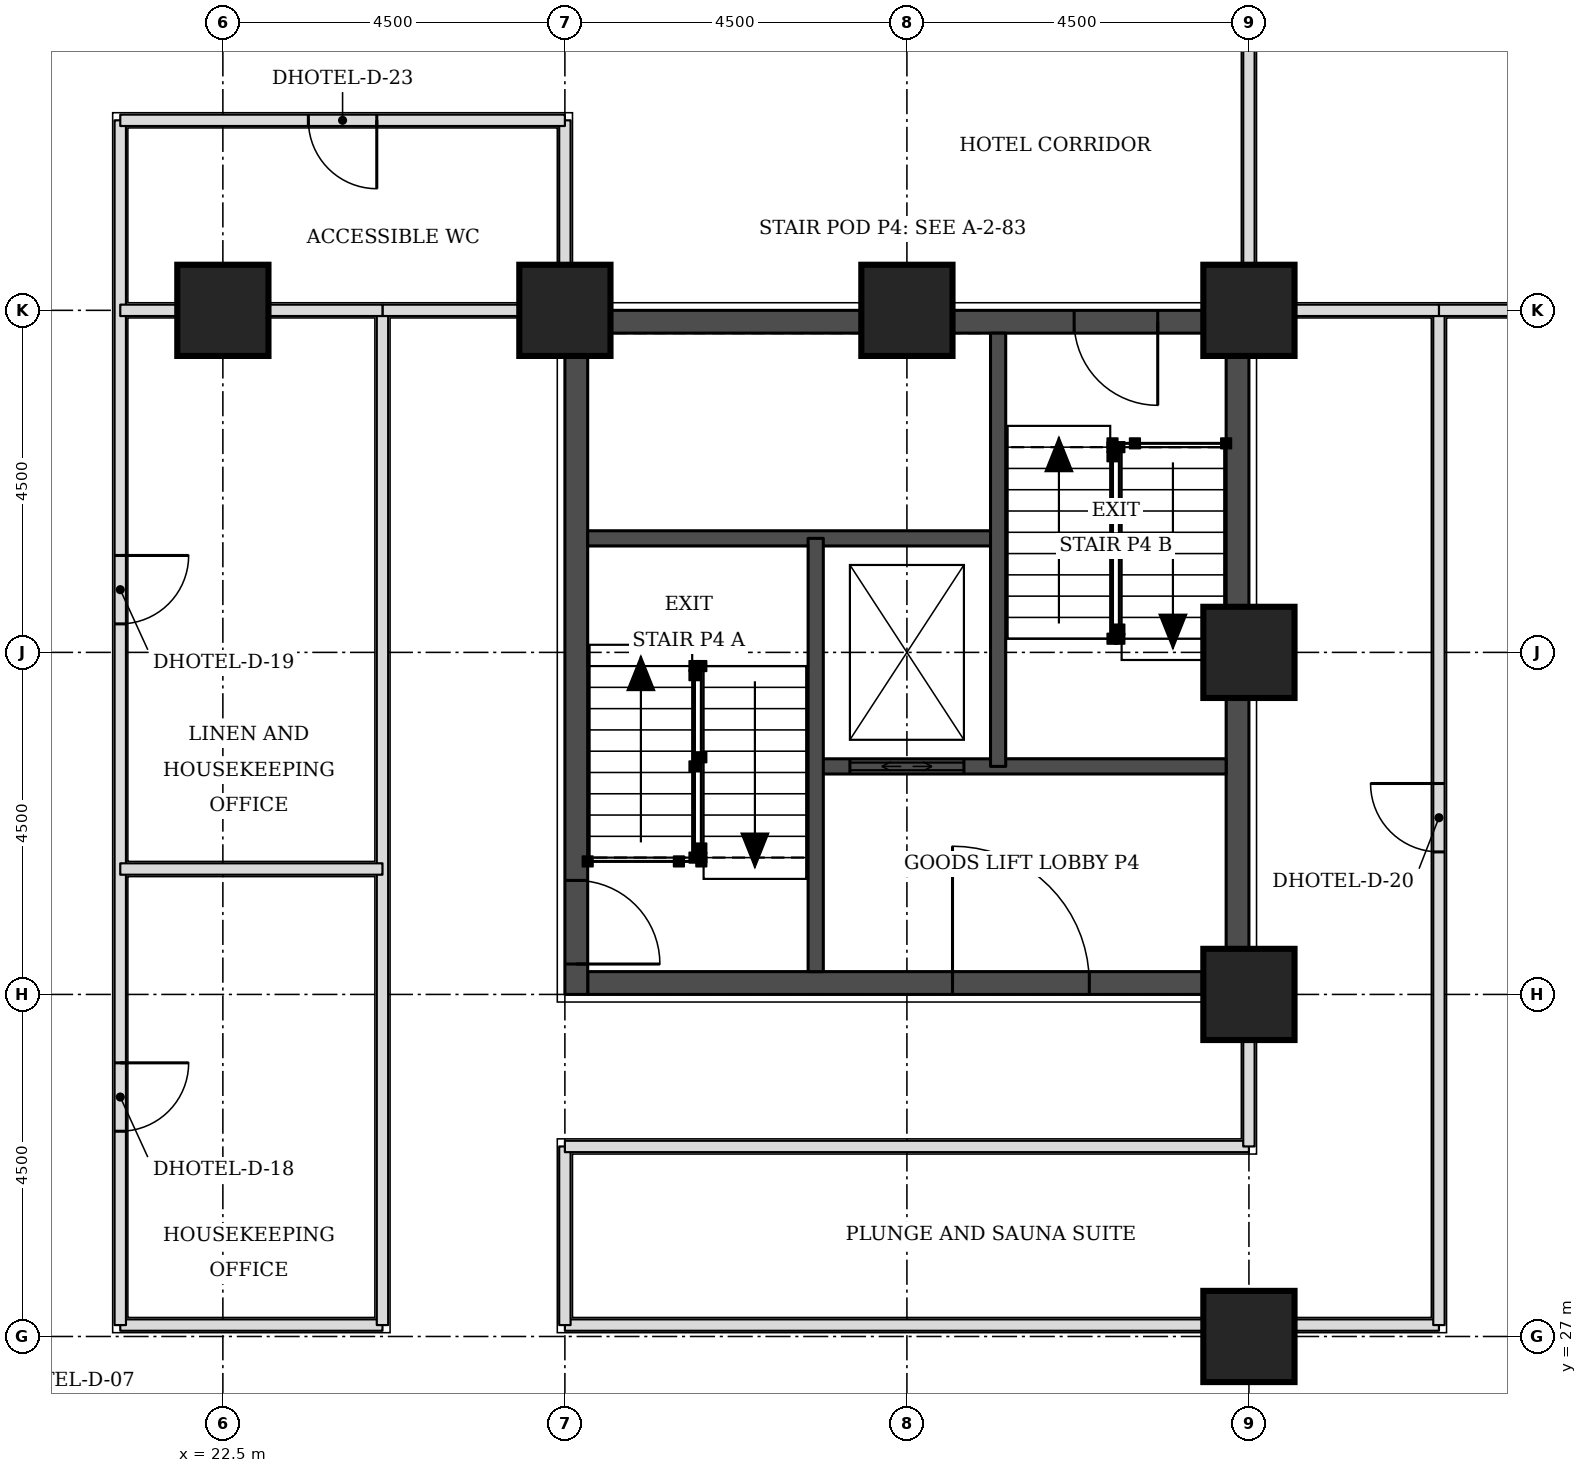
"""IFC4 building model, lengths in metres.
Left out: names, types, materials, properties, quantities, classifications, styles, units other than length and angle.
Written with IfcOpenShell. Run it as: python <this file> out.ifc"""

import sys

from ifc_helpers import new_model, si_unit, direction, frame, frame_2d, origin, origin_2d, place, context, subcontext, project, spatial, rectangle, extrude, element, fill, save


model = new_model("IFC4")
c1 = context("Model", 3, precision=1e-05, world=origin(), true_north=direction((0.0, 1.0)))
c2 = subcontext(c1, "Body", "Model", "MODEL_VIEW")
j1 = project(units=[si_unit("LENGTHUNIT", "METRE"), si_unit("PLANEANGLEUNIT", "RADIAN")], contexts=[c1])
p1 = place(None, origin())
s1 = spatial("IfcSite", under=j1, at=p1, CompositionType="ELEMENT")
p2 = place(p1, origin())
s2 = spatial("IfcBuilding", under=s1, at=p2, CompositionType="ELEMENT")
p3 = place(p2, frame((0.0, 0.0, 59.4)))
s3 = spatial("IfcBuildingStorey", under=s2, at=p3, CompositionType="ELEMENT", Elevation=59.4)
for number, where, z_axis, x_axis in (
    (1, (36.0, 27.0, 0.0), (0.0, 0.0, 1.0), (1.0, 0.0, 0.0)),
    (2, (36.0, 31.5, 0.0), (0.0, 0.0, 1.0), (1.0, 0.0, 0.0)),
    (3, (36.0, 36.0, 0.0), (0.0, 0.0, 1.0), (1.0, 0.0, 0.0)),
    (4, (22.5, 40.5, 0.0), (0.0, 0.0, 1.0), (1.0, 0.0, 0.0)),
    (5, (27.0, 40.5, 0.0), (0.0, 0.0, 1.0), (1.0, 0.0, 0.0)),
    (6, (31.5, 40.5, 0.0), (0.0, 0.0, 1.0), (1.0, 0.0, 0.0)),
    (7, (36.0, 40.5, 0.0), (0.0, 0.0, 1.0), (1.0, 0.0, 0.0)),
):
    element("IfcColumn", number, at=place(p3, frame(where, z_axis=z_axis, x_axis=x_axis)), inside=s3, PredefinedType="COLUMN", context=c2, shape_type="SweptSolid", body=[
        extrude(rectangle(XDim=1.2, YDim=1.2, at=origin_2d()), origin(), (0.0, 0.0, 1.0), 3.3),
    ])
p4 = place(p3, frame((27.3, 31.65, 0.0), z_axis=(0.0, 0.0, 1.0), x_axis=(1.0, 0.0, 0.0)))
e8 = element("IfcWall", 8, at=p4, inside=s3, PredefinedType="SHEAR", context=c2, shape_type="SweptSolid", body=[
    extrude(rectangle(XDim=8.4, YDim=0.3, at=frame_2d((4.2, 0.0))), origin(), (0.0, 0.0, 1.0), 3.3),
])
p5 = place(p4, frame((4.8, 0.0, 0.0)))
e9 = element("IfcOpeningElement", 9, at=p5, cuts=e8, PredefinedType="OPENING", context=c2, shape_type="SweptSolid", body=[
    extrude(rectangle(XDim=1.8, YDim=2.1, at=frame_2d((0.9, 1.05))), frame((0.0, 0.16, 0.0), z_axis=(0.0, -1.0, 0.0), x_axis=(1.0, 0.0, 0.0)), (0.0, 0.0, 1.0), 0.32),
])
p6 = place(p3, frame((27.3, 40.35, 0.0), z_axis=(0.0, 0.0, 1.0), x_axis=(1.0, 0.0, 0.0)))
e10 = element("IfcWall", 10, at=p6, inside=s3, PredefinedType="SHEAR", context=c2, shape_type="SweptSolid", body=[
    extrude(rectangle(XDim=8.4, YDim=0.3, at=frame_2d((4.2, 0.0))), origin(), (0.0, 0.0, 1.0), 3.3),
])
p7 = place(p6, frame((6.4, 0.0, 0.0)))
e11 = element("IfcOpeningElement", 11, at=p7, cuts=e10, PredefinedType="OPENING", context=c2, shape_type="SweptSolid", body=[
    extrude(rectangle(XDim=1.1, YDim=2.1, at=frame_2d((0.55, 1.05))), frame((0.0, 0.16, 0.0), z_axis=(0.0, -1.0, 0.0), x_axis=(1.0, 0.0, 0.0)), (0.0, 0.0, 1.0), 0.32),
])
p8 = place(p3, frame((27.15, 31.5, 0.0), z_axis=(0.0, 0.0, 1.0), x_axis=(0.0, 1.0, 0.0)))
e12 = element("IfcWall", 12, at=p8, inside=s3, PredefinedType="SHEAR", context=c2, shape_type="SweptSolid", body=[
    extrude(rectangle(XDim=9.0, YDim=0.3, at=frame_2d((4.5, 0.0))), origin(), (0.0, 0.0, 1.0), 3.3),
])
p9 = place(p8, frame((0.4, 0.0, 0.0)))
e13 = element("IfcOpeningElement", 13, at=p9, cuts=e12, PredefinedType="OPENING", context=c2, shape_type="SweptSolid", body=[
    extrude(rectangle(XDim=1.1, YDim=2.1, at=frame_2d((0.55, 1.05))), frame((0.0, 0.16, 0.0), z_axis=(0.0, -1.0, 0.0), x_axis=(1.0, 0.0, 0.0)), (0.0, 0.0, 1.0), 0.32),
])
p10 = place(p3, frame((35.85, 31.5, 0.0), z_axis=(0.0, 0.0, 1.0), x_axis=(0.0, 1.0, 0.0)))
e14 = element("IfcWall", 14, at=p10, inside=s3, PredefinedType="SHEAR", context=c2, shape_type="SweptSolid", body=[
    extrude(rectangle(XDim=9.0, YDim=0.3, at=frame_2d((4.5, 0.0))), origin(), (0.0, 0.0, 1.0), 3.3),
])
p11 = place(p3, frame((21.15, 27.15, 0.0), z_axis=(0.0, 0.0, 1.0), x_axis=(1.0, 0.0, 0.0)))
e15 = element("IfcWall", 15, at=p11, inside=s3, PredefinedType="PARTITIONING", context=c2, shape_type="SweptSolid", body=[
    extrude(rectangle(XDim=3.45, YDim=0.15, at=frame_2d((1.725, 0.0))), origin(), (0.0, 0.0, 1.0), 3.08),
])
p12 = place(p3, frame((21.15, 27.15, 0.0), z_axis=(0.0, 0.0, 1.0), x_axis=(0.0, 1.0, 0.0)))
e16 = element("IfcWall", 16, at=p12, inside=s3, PredefinedType="PARTITIONING", context=c2, shape_type="SweptSolid", body=[
    extrude(rectangle(XDim=15.85, YDim=0.15, at=frame_2d((7.925, 0.0))), origin(), (0.0, 0.0, 1.0), 3.08),
])
p13 = place(p12, frame((2.55, 0.0, 0.0)))
e17 = element("IfcOpeningElement", 17, at=p13, cuts=e16, PredefinedType="OPENING", context=c2, shape_type="SweptSolid", body=[
    extrude(rectangle(XDim=0.9, YDim=2.1, at=frame_2d((0.45, 1.05))), frame((0.0, 0.085, 0.0), z_axis=(0.0, -1.0, 0.0), x_axis=(1.0, 0.0, 0.0)), (0.0, 0.0, 1.0), 0.17),
])
p14 = place(p12, frame((9.225, 0.0, 0.0)))
e18 = element("IfcOpeningElement", 18, at=p14, cuts=e16, PredefinedType="OPENING", context=c2, shape_type="SweptSolid", body=[
    extrude(rectangle(XDim=0.9, YDim=2.1, at=frame_2d((0.45, 1.05))), frame((0.0, 0.085, 0.0), z_axis=(0.0, -1.0, 0.0), x_axis=(1.0, 0.0, 0.0)), (0.0, 0.0, 1.0), 0.17),
])
p15 = place(p3, frame((24.6, 27.15, 0.0), z_axis=(0.0, 0.0, 1.0), x_axis=(0.0, 1.0, 0.0)))
e19 = element("IfcWall", 19, at=p15, inside=s3, PredefinedType="PARTITIONING", context=c2, shape_type="SweptSolid", body=[
    extrude(rectangle(XDim=13.35, YDim=0.15, at=frame_2d((6.675, 0.0))), origin(), (0.0, 0.0, 1.0), 3.08),
])
p16 = place(p3, frame((27.0, 27.15, 0.0), z_axis=(0.0, 0.0, 1.0), x_axis=(1.0, 0.0, 0.0)))
e20 = element("IfcWall", 20, at=p16, inside=s3, PredefinedType="PARTITIONING", context=c2, shape_type="SweptSolid", body=[
    extrude(rectangle(XDim=11.5, YDim=0.15, at=frame_2d((5.75, 0.0))), origin(), (0.0, 0.0, 1.0), 3.08),
])
p17 = place(p3, frame((27.0, 27.15, 0.0), z_axis=(0.0, 0.0, 1.0), x_axis=(0.0, 1.0, 0.0)))
e21 = element("IfcWall", 21, at=p17, inside=s3, PredefinedType="PARTITIONING", context=c2, shape_type="SweptSolid", body=[
    extrude(rectangle(XDim=2.35, YDim=0.15, at=frame_2d((1.175, 0.0))), origin(), (0.0, 0.0, 1.0), 3.08),
])
p18 = place(p3, frame((38.5, 27.15, 0.0), z_axis=(0.0, 0.0, 1.0), x_axis=(0.0, 1.0, 0.0)))
e22 = element("IfcWall", 22, at=p18, inside=s3, PredefinedType="PARTITIONING", context=c2, shape_type="SweptSolid", body=[
    extrude(rectangle(XDim=13.35, YDim=0.15, at=frame_2d((6.675, 0.0))), origin(), (0.0, 0.0, 1.0), 3.08),
])
p19 = place(p18, frame((6.225, 0.0, 0.0)))
e23 = element("IfcOpeningElement", 23, at=p19, cuts=e22, PredefinedType="OPENING", context=c2, shape_type="SweptSolid", body=[
    extrude(rectangle(XDim=0.9, YDim=2.1, at=frame_2d((0.45, 1.05))), frame((0.0, 0.085, 0.0), z_axis=(0.0, -1.0, 0.0), x_axis=(1.0, 0.0, 0.0)), (0.0, 0.0, 1.0), 0.17),
])
p20 = place(p3, frame((27.0, 29.5, 0.0), z_axis=(0.0, 0.0, 1.0), x_axis=(1.0, 0.0, 0.0)))
e24 = element("IfcWall", 24, at=p20, inside=s3, PredefinedType="PARTITIONING", context=c2, shape_type="SweptSolid", body=[
    extrude(rectangle(XDim=9.0, YDim=0.15, at=frame_2d((4.5, 0.0))), origin(), (0.0, 0.0, 1.0), 3.08),
])
p21 = place(p3, frame((36.0, 29.5, 0.0), z_axis=(0.0, 0.0, 1.0), x_axis=(0.0, 1.0, 0.0)))
e25 = element("IfcWall", 25, at=p21, inside=s3, PredefinedType="PARTITIONING", context=c2, shape_type="SweptSolid", body=[
    extrude(rectangle(XDim=1.95, YDim=0.15, at=frame_2d((0.975, 0.0))), origin(), (0.0, 0.0, 1.0), 2.33),
])
p22 = place(p3, frame((24.6, 40.5, 0.0), z_axis=(0.0, 0.0, 1.0), x_axis=(1.0, 0.0, 0.0)))
e26 = element("IfcWall", 26, at=p22, inside=s3, PredefinedType="PARTITIONING", context=c2, shape_type="SweptSolid", body=[
    extrude(rectangle(XDim=2.35, YDim=0.15, at=frame_2d((1.175, 0.0))), origin(), (0.0, 0.0, 1.0), 2.33),
])
p23 = place(p3, frame((38.5, 40.5, 0.0), z_axis=(0.0, 0.0, 1.0), x_axis=(1.0, 0.0, 0.0)))
e27 = element("IfcWall", 27, at=p23, inside=s3, PredefinedType="PARTITIONING", context=c2, shape_type="SweptSolid", body=[
    extrude(rectangle(XDim=1.95, YDim=0.15, at=frame_2d((0.975, 0.0))), origin(), (0.0, 0.0, 1.0), 2.33),
])
p24 = place(p3, frame((27.0, 40.55, 0.0), z_axis=(0.0, 0.0, 1.0), x_axis=(0.0, 1.0, 0.0)))
e28 = element("IfcWall", 28, at=p24, inside=s3, PredefinedType="PARTITIONING", context=c2, shape_type="SweptSolid", body=[
    extrude(rectangle(XDim=2.45, YDim=0.15, at=frame_2d((1.225, 0.0))), origin(), (0.0, 0.0, 1.0), 3.08),
])
p25 = place(p3, frame((36.0, 40.55, 0.0), z_axis=(0.0, 0.0, 1.0), x_axis=(0.0, 1.0, 0.0)))
e29 = element("IfcWall", 29, at=p25, inside=s3, PredefinedType="PARTITIONING", context=c2, shape_type="SweptSolid", body=[
    extrude(rectangle(XDim=4.4, YDim=0.15, at=frame_2d((2.2, 0.0))), origin(), (0.0, 0.0, 1.0), 2.33),
])
p26 = place(p3, frame((21.15, 43.0, 0.0), z_axis=(0.0, 0.0, 1.0), x_axis=(1.0, 0.0, 0.0)))
e30 = element("IfcWall", 30, at=p26, inside=s3, PredefinedType="PARTITIONING", context=c2, shape_type="SweptSolid", body=[
    extrude(rectangle(XDim=5.85, YDim=0.15, at=frame_2d((2.925, 0.0))), origin(), (0.0, 0.0, 1.0), 3.08),
])
p27 = place(p26, frame((2.475, 0.0, 0.0)))
e31 = element("IfcOpeningElement", 31, at=p27, cuts=e30, PredefinedType="OPENING", context=c2, shape_type="SweptSolid", body=[
    extrude(rectangle(XDim=0.9, YDim=2.1, at=frame_2d((0.45, 1.05))), frame((0.0, 0.085, 0.0), z_axis=(0.0, -1.0, 0.0), x_axis=(1.0, 0.0, 0.0)), (0.0, 0.0, 1.0), 0.17),
])
p28 = place(p3, frame((21.15, 33.15, 0.0), z_axis=(0.0, 0.0, 1.0), x_axis=(1.0, 0.0, 0.0)))
e32 = element("IfcWall", 32, at=p28, inside=s3, PredefinedType="PARTITIONING", context=c2, shape_type="SweptSolid", body=[
    extrude(rectangle(XDim=3.45, YDim=0.15, at=frame_2d((1.725, 0.0))), origin(), (0.0, 0.0, 1.0), 3.08),
])
p29 = place(p3, frame((21.15, 40.5, 0.0), z_axis=(0.0, 0.0, 1.0), x_axis=(1.0, 0.0, 0.0)))
e33 = element("IfcWall", 33, at=p29, inside=s3, PredefinedType="PARTITIONING", context=c2, shape_type="SweptSolid", body=[
    extrude(rectangle(XDim=3.45, YDim=0.15, at=frame_2d((1.725, 0.0))), origin(), (0.0, 0.0, 1.0), 2.33),
])
p30 = place(p3, frame((36.05, 40.5, 0.0), z_axis=(0.0, 0.0, 1.0), x_axis=(1.0, 0.0, 0.0)))
e34 = element("IfcWall", 34, at=p30, inside=s3, PredefinedType="PARTITIONING", context=c2, shape_type="SweptSolid", body=[
    extrude(rectangle(XDim=2.45, YDim=0.15, at=frame_2d((1.225, 0.0))), origin(), (0.0, 0.0, 1.0), 2.33),
])
p31 = place(p3, frame((30.3, 34.5, 0.0), z_axis=(0.0, 0.0, 1.0), x_axis=(1.0, 0.0, 0.0)))
e35 = element("IfcWall", 35, at=p31, inside=s3, PredefinedType="SOLIDWALL", context=c2, shape_type="SweptSolid", body=[
    extrude(rectangle(XDim=5.4, YDim=0.2, at=frame_2d((2.7, 0.0))), origin(), (0.0, 0.0, 1.0), 3.08),
])
p32 = place(p31, frame((0.45, 0.0, 0.0)))
e36 = element("IfcOpeningElement", 36, at=p32, cuts=e35, PredefinedType="OPENING", context=c2, shape_type="SweptSolid", body=[
    extrude(rectangle(XDim=1.5, YDim=2.1, at=frame_2d((0.75, 1.05))), frame((0.0, 0.11, 0.0), z_axis=(0.0, -1.0, 0.0), x_axis=(1.0, 0.0, 0.0)), (0.0, 0.0, 1.0), 0.22),
])
p33 = place(p3, frame((27.3, 37.5, 0.0), z_axis=(0.0, 0.0, 1.0), x_axis=(1.0, 0.0, 0.0)))
e37 = element("IfcWall", 37, at=p33, inside=s3, PredefinedType="SOLIDWALL", context=c2, shape_type="SweptSolid", body=[
    extrude(rectangle(XDim=5.4, YDim=0.2, at=frame_2d((2.7, 0.0))), origin(), (0.0, 0.0, 1.0), 3.08),
])
for number, where, z_axis, x_axis in (
    (38, (30.3, 31.8, 0.0), (0.0, 0.0, 1.0), (0.0, 1.0, 0.0)),
    (39, (32.7, 34.5, 0.0), (0.0, 0.0, 1.0), (0.0, 1.0, 0.0)),
):
    element("IfcWall", number, at=place(p3, frame(where, z_axis=z_axis, x_axis=x_axis)), inside=s3, PredefinedType="SOLIDWALL", context=c2, shape_type="SweptSolid", body=[
        extrude(rectangle(XDim=5.7, YDim=0.2, at=frame_2d((2.85, 0.0))), origin(), (0.0, 0.0, 1.0), 3.08),
    ])
p34 = place(p13, frame((0.9, 0.0, 0.0), z_axis=(0.0, 0.0, 1.0), x_axis=(-1.0, 0.0, 0.0)))
e40 = element("IfcDoor", 40, at=p34, inside=s3, OperationType="SINGLE_SWING_LEFT", PredefinedType="DOOR", context=c2, shape_type="SweptSolid", body=[
    extrude(rectangle(XDim=0.9, YDim=2.1, at=frame_2d((0.45, 1.05))), frame((0.0, 0.025, 0.0), z_axis=(0.0, -1.0, 0.0), x_axis=(1.0, 0.0, 0.0)), (0.0, 0.0, 1.0), 0.05),
])
fill(e17, e40)
p35 = place(p14, frame((0.9, 0.0, 0.0), z_axis=(0.0, 0.0, 1.0), x_axis=(-1.0, 0.0, 0.0)))
e41 = element("IfcDoor", 41, at=p35, inside=s3, OperationType="SINGLE_SWING_LEFT", PredefinedType="DOOR", context=c2, shape_type="SweptSolid", body=[
    extrude(rectangle(XDim=0.9, YDim=2.1, at=frame_2d((0.45, 1.05))), frame((0.0, 0.025, 0.0), z_axis=(0.0, -1.0, 0.0), x_axis=(1.0, 0.0, 0.0)), (0.0, 0.0, 1.0), 0.05),
])
fill(e18, e41)
p36 = place(p19, origin())
e42 = element("IfcDoor", 42, at=p36, inside=s3, OperationType="SINGLE_SWING_RIGHT", PredefinedType="DOOR", context=c2, shape_type="SweptSolid", body=[
    extrude(rectangle(XDim=0.9, YDim=2.1, at=frame_2d((0.45, 1.05))), frame((0.0, 0.025, 0.0), z_axis=(0.0, -1.0, 0.0), x_axis=(1.0, 0.0, 0.0)), (0.0, 0.0, 1.0), 0.05),
])
fill(e23, e42)
p37 = place(p27, frame((0.9, 0.0, 0.0), z_axis=(0.0, 0.0, 1.0), x_axis=(-1.0, 0.0, 0.0)))
e43 = element("IfcDoor", 43, at=p37, inside=s3, OperationType="SINGLE_SWING_LEFT", PredefinedType="DOOR", context=c2, shape_type="SweptSolid", body=[
    extrude(rectangle(XDim=0.9, YDim=2.1, at=frame_2d((0.45, 1.05))), frame((0.0, 0.025, 0.0), z_axis=(0.0, -1.0, 0.0), x_axis=(1.0, 0.0, 0.0)), (0.0, 0.0, 1.0), 0.05),
])
fill(e31, e43)
p38 = place(p9, frame((1.1, 0.0, 0.0), z_axis=(0.0, 0.0, 1.0), x_axis=(-1.0, 0.0, 0.0)))
e44 = element("IfcDoor", 44, at=p38, inside=s3, OperationType="SINGLE_SWING_RIGHT", PredefinedType="DOOR", context=c2, shape_type="SweptSolid", body=[
    extrude(rectangle(XDim=1.1, YDim=2.1, at=frame_2d((0.55, 1.05))), frame((0.0, 0.025, 0.0), z_axis=(0.0, -1.0, 0.0), x_axis=(1.0, 0.0, 0.0)), (0.0, 0.0, 1.0), 0.05),
])
fill(e13, e44)
p39 = place(p7, frame((1.1, 0.0, 0.0), z_axis=(0.0, 0.0, 1.0), x_axis=(-1.0, 0.0, 0.0)))
e45 = element("IfcDoor", 45, at=p39, inside=s3, OperationType="SINGLE_SWING_LEFT", PredefinedType="DOOR", context=c2, shape_type="SweptSolid", body=[
    extrude(rectangle(XDim=1.1, YDim=2.1, at=frame_2d((0.55, 1.05))), frame((0.0, 0.025, 0.0), z_axis=(0.0, -1.0, 0.0), x_axis=(1.0, 0.0, 0.0)), (0.0, 0.0, 1.0), 0.05),
])
fill(e11, e45)
p40 = place(p32, origin())
e46 = element("IfcDoor", 46, at=p40, inside=s3, OperationType="DOUBLE_DOOR_SLIDING", PredefinedType="DOOR", context=c2, shape_type="SweptSolid", body=[
    extrude(rectangle(XDim=1.5, YDim=2.1, at=frame_2d((0.75, 1.05))), frame((0.0, 0.025, 0.0), z_axis=(0.0, -1.0, 0.0), x_axis=(1.0, 0.0, 0.0)), (0.0, 0.0, 1.0), 0.05),
])
fill(e36, e46)
p41 = place(p5, origin())
e47 = element("IfcDoor", 47, at=p41, inside=s3, OperationType="SINGLE_SWING_LEFT", PredefinedType="DOOR", context=c2, shape_type="SweptSolid", body=[
    extrude(rectangle(XDim=1.8, YDim=2.1, at=frame_2d((0.9, 1.05))), frame((0.0, 0.025, 0.0), z_axis=(0.0, -1.0, 0.0), x_axis=(1.0, 0.0, 0.0)), (0.0, 0.0, 1.0), 0.05),
])
fill(e9, e47)
save(model, sys.argv[1])
